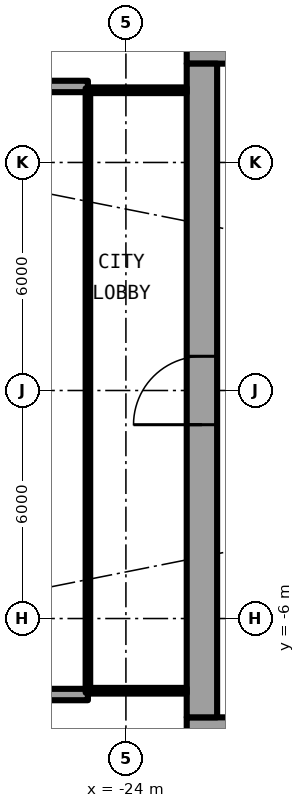
"""IFC4 building model, lengths in metres.
Left out: names, types, materials, properties, quantities, classifications, styles, units other than length and angle.
Written with IfcOpenShell. Run it as: python <this file> out.ifc"""

import sys

from ifc_helpers import new_model, si_unit, direction, frame, frame_2d, origin, place, context, subcontext, project, spatial, rectangle, extrude, element, fill, save


model = new_model("IFC4")
c1 = context("Model", 3, precision=1e-05, world=origin(), true_north=direction((0.0, 1.0)))
c2 = subcontext(c1, "Body", "Model", "MODEL_VIEW")
j1 = project(units=[si_unit("LENGTHUNIT", "METRE"), si_unit("PLANEANGLEUNIT", "RADIAN")], contexts=[c1])
p1 = place(None, origin())
s1 = spatial("IfcSite", under=j1, at=p1, CompositionType="ELEMENT")
p2 = place(p1, origin())
s2 = spatial("IfcBuilding", under=s1, at=p2, CompositionType="ELEMENT")
p3 = place(p2, frame((0.0, 0.0, 22.8)))
s3 = spatial("IfcBuildingStorey", under=s2, at=p3, CompositionType="ELEMENT", Elevation=22.8)
for number, where, z_axis, x_axis in (
    (1, (-25.0, 8.0, 0.0), (0.0, 0.0, 1.0), (-1.0, 0.0, 0.0)),
    (2, (-25.0, -8.0, 0.0), (0.0, 0.0, 1.0), (-1.0, 0.0, 0.0)),
):
    element("IfcWall", number, at=place(p3, frame(where, z_axis=z_axis, x_axis=x_axis)), inside=s3, PredefinedType="SOLIDWALL", context=c2, shape_type="SweptSolid", body=[
        extrude(rectangle(XDim=2.667, YDim=0.3, at=frame_2d((1.333, 0.0))), origin(), (0.0, 0.0, 1.0), 2.7),
    ])
p4 = place(p3, frame((-22.4, -9.0, 0.0), z_axis=(0.0, 0.0, 1.0), x_axis=(1.0, 0.0, 0.0)))
e3 = element("IfcWall", 3, at=p4, inside=s3, PredefinedType="SHEAR", context=c2, shape_type="SweptSolid", body=[
    extrude(rectangle(XDim=14.2, YDim=0.8, at=frame_2d((7.1, 0.0))), origin(), (0.0, 0.0, 1.0), 3.05),
])
p5 = place(p4, frame((1.325, 0.0, 0.0)))
e4 = element("IfcOpeningElement", 4, at=p5, cuts=e3, PredefinedType="OPENING", context=c2, shape_type="SweptSolid", body=[
    extrude(rectangle(XDim=1.2, YDim=2.3, at=frame_2d((0.6, 1.15))), frame((0.0, 0.41, 0.0), z_axis=(0.0, -1.0, 0.0), x_axis=(1.0, 0.0, 0.0)), (0.0, 0.0, 1.0), 0.82),
])
p6 = place(p3, frame((-8.2, 9.0, 0.0), z_axis=(0.0, 0.0, 1.0), x_axis=(-1.0, 0.0, 0.0)))
e5 = element("IfcWall", 5, at=p6, inside=s3, PredefinedType="SHEAR", context=c2, shape_type="SweptSolid", body=[
    extrude(rectangle(XDim=14.2, YDim=0.8, at=frame_2d((7.1, 0.0))), origin(), (0.0, 0.0, 1.0), 3.05),
])
p7 = place(p6, frame((11.675, 0.0, 0.0)))
e6 = element("IfcOpeningElement", 6, at=p7, cuts=e5, PredefinedType="OPENING", context=c2, shape_type="SweptSolid", body=[
    extrude(rectangle(XDim=1.2, YDim=2.3, at=frame_2d((0.6, 1.15))), frame((0.0, 0.41, 0.0), z_axis=(0.0, -1.0, 0.0), x_axis=(1.0, 0.0, 0.0)), (0.0, 0.0, 1.0), 0.82),
])
p8 = place(p3, frame((-22.0, -8.6, 0.0), z_axis=(0.0, 0.0, 1.0), x_axis=(0.0, 1.0, 0.0)))
e7 = element("IfcWall", 7, at=p8, inside=s3, PredefinedType="SHEAR", context=c2, shape_type="SweptSolid", body=[
    extrude(rectangle(XDim=17.2, YDim=0.8, at=frame_2d((8.6, 0.0))), origin(), (0.0, 0.0, 1.0), 3.05),
])
p9 = place(p8, frame((7.7, 0.0, 0.0)))
e8 = element("IfcOpeningElement", 8, at=p9, cuts=e7, PredefinedType="OPENING", context=c2, shape_type="SweptSolid", body=[
    extrude(rectangle(XDim=1.8, YDim=2.3, at=frame_2d((0.9, 1.15))), frame((0.0, 0.41, 0.0), z_axis=(0.0, -1.0, 0.0), x_axis=(1.0, 0.0, 0.0)), (0.0, 0.0, 1.0), 0.82),
])
for number, where, z_axis, x_axis in (
    (9, (-22.4, 7.9, 0.0), (0.0, 0.0, 1.0), (-1.0, 0.0, 0.0)),
    (10, (-22.4, -7.9, 0.0), (0.0, 0.0, 1.0), (-1.0, 0.0, 0.0)),
):
    element("IfcWall", number, at=place(p3, frame(where, z_axis=z_axis, x_axis=x_axis)), inside=s3, PredefinedType="PARTITIONING", context=c2, shape_type="SweptSolid", body=[
        extrude(rectangle(XDim=2.54, YDim=0.15, at=frame_2d((1.27, 0.0))), origin(), (0.0, 0.0, 1.0), 2.7),
    ])
p10 = place(p3, frame((-25.0, 7.95, 0.0), z_axis=(0.0, 0.0, 1.0), x_axis=(0.0, -1.0, 0.0)))
e11 = element("IfcWall", 11, at=p10, inside=s3, PredefinedType="PARTITIONING", context=c2, shape_type="SweptSolid", body=[
    extrude(rectangle(XDim=15.9, YDim=0.12, at=frame_2d((7.95, 0.0))), origin(), (0.0, 0.0, 1.0), 2.7),
])
p11 = place(p10, frame((0.95, 0.0, 0.1)))
e12 = element("IfcOpeningElement", 12, at=p11, cuts=e11, PredefinedType="OPENING", context=c2, shape_type="SweptSolid", body=[
    extrude(rectangle(XDim=14.0, YDim=2.35, at=frame_2d((7.0, 1.175))), frame((0.0, 0.07, 0.0), z_axis=(0.0, -1.0, 0.0), x_axis=(1.0, 0.0, 0.0)), (0.0, 0.0, 1.0), 0.14),
])
p12 = place(p9, origin())
e13 = element("IfcDoor", 13, at=p12, inside=s3, OperationType="SINGLE_SWING_LEFT", PredefinedType="DOOR", context=c2, shape_type="SweptSolid", body=[
    extrude(rectangle(XDim=1.8, YDim=2.3, at=frame_2d((0.9, 1.15))), frame((0.0, 0.025, 0.0), z_axis=(0.0, -1.0, 0.0), x_axis=(1.0, 0.0, 0.0)), (0.0, 0.0, 1.0), 0.05),
])
fill(e8, e13)
p13 = place(p11, origin())
e14 = element("IfcWindow", 14, at=p13, inside=s3, PartitioningType="SINGLE_PANEL", PredefinedType="WINDOW", context=c2, shape_type="SweptSolid", body=[
    extrude(rectangle(XDim=14.0, YDim=2.35, at=frame_2d((7.0, 1.175))), frame((0.0, 0.03, 0.0), z_axis=(0.0, -1.0, 0.0), x_axis=(1.0, 0.0, 0.0)), (0.0, 0.0, 1.0), 0.06),
])
fill(e12, e14)
save(model, sys.argv[1])
